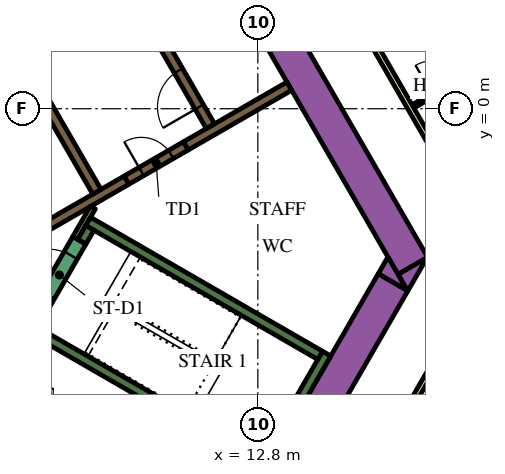
"""IFC4 building model, lengths in metres.
Left out: names, types, materials, properties, quantities, classifications, styles, units other than length and angle.
Written with IfcOpenShell. Run it as: python <this file> out.ifc"""

import sys

from ifc_helpers import new_model, si_unit, direction, frame, frame_2d, origin, place, context, subcontext, project, spatial, polyline, rectangle, outline, extrude, element, fill, save


model = new_model("IFC4")
c1 = context("Model", 3, precision=1e-05, world=origin(), true_north=direction((0.0, 1.0)))
c2 = subcontext(c1, "Body", "Model", "MODEL_VIEW")
j1 = project(units=[si_unit("LENGTHUNIT", "METRE"), si_unit("PLANEANGLEUNIT", "RADIAN")], contexts=[c1])
p1 = place(None, origin())
s1 = spatial("IfcSite", under=j1, at=p1, CompositionType="ELEMENT")
p2 = place(p1, origin())
s2 = spatial("IfcBuilding", under=s1, at=p2, CompositionType="ELEMENT")
p3 = place(p2, frame((0.0, 0.0, 111.0)))
s3 = spatial("IfcBuildingStorey", under=s2, at=p3, CompositionType="ELEMENT", Elevation=111.0)
p4 = place(p3, frame((6.711, 13.476, 0.0), z_axis=(0.0, 0.0, 1.0), x_axis=(0.500002723396, -0.866023831425, 0.0)))
e1 = element("IfcWall", 1, at=p4, inside=s3, PredefinedType="SOLIDWALL", context=c2, shape_type="SweptSolid", body=[
    extrude(rectangle(XDim=20.334, YDim=0.9, at=frame_2d((10.167, 0.0))), origin(), (0.0, 0.0, 1.0), 3.9),
])
p5 = place(p3, origin())
e2 = element("IfcWall", 2, at=p5, inside=s3, PredefinedType="SOLIDWALL", context=c2, shape_type="SweptSolid", body=[
    extrude(outline(polyline([(16.743, -4.8), (16.489, -4.36), (17.251, -3.92), (16.743, -4.8)])), origin(), (0.0, 0.0, 1.0), 3.9),
])
p6 = place(p3, frame((11.695, -12.644, 0.0), z_axis=(0.0, 0.0, 1.0), x_axis=(0.500010229568, 0.86601949766, 0.0)))
e3 = element("IfcWall", 3, at=p6, inside=s3, PredefinedType="SOLIDWALL", context=c2, shape_type="SweptSolid", body=[
    extrude(rectangle(XDim=9.326, YDim=0.9, at=frame_2d((4.663, 0.0))), origin(), (0.0, 0.0, 1.0), 3.9),
])
e4 = element("IfcWall", 4, at=p5, inside=s3, PredefinedType="SOLIDWALL", context=c2, shape_type="SweptSolid", body=[
    extrude(outline(polyline([(16.223, -3.9), (16.732, -4.78), (15.969, -4.34), (16.223, -3.9)])), origin(), (0.0, 0.0, 1.0), 3.9),
])
p7 = place(p3, frame((12.885, -9.431, 0.0), z_axis=(0.0, 0.0, 1.0), x_axis=(0.500020560727, 0.866013532718, 0.0)))
e5 = element("IfcWall", 5, at=p7, inside=s3, PredefinedType="SOLIDWALL", context=c2, shape_type="SweptSolid", body=[
    extrude(rectangle(XDim=3.45, YDim=0.25, at=frame_2d((1.725, 0.0))), origin(), (0.0, 0.0, 1.0), 3.9),
])
p8 = place(p3, frame((12.84, -9.261, 0.0), z_axis=(0.0, 0.0, 1.0), x_axis=(-0.866013990052, 0.500019768644, 0.0)))
e6 = element("IfcWall", 6, at=p8, inside=s3, PredefinedType="SOLIDWALL", context=c2, shape_type="SweptSolid", body=[
    extrude(rectangle(XDim=6.8, YDim=0.25, at=frame_2d((3.4, 0.0))), origin(), (0.0, 0.0, 1.0), 3.9),
])
p9 = place(p3, frame((8.334, -2.964, 0.0), z_axis=(0.0, 0.0, 1.0), x_axis=(0.866016039709, -0.500016218704, 0.0)))
e7 = element("IfcWall", 7, at=p9, inside=s3, PredefinedType="SOLIDWALL", context=c2, shape_type="SweptSolid", body=[
    extrude(rectangle(XDim=7.05, YDim=0.25, at=frame_2d((3.525, 0.0))), origin(), (0.0, 0.0, 1.0), 3.9),
])
p10 = place(p3, frame((8.168, -3.503, 0.0), z_axis=(0.0, 0.0, 1.0), x_axis=(0.49972245349, 0.866185586049, 0.0)))
e8 = element("IfcWall", 8, at=p10, inside=s3, PredefinedType="SOLIDWALL", context=c2, shape_type="SweptSolid", body=[
    extrude(rectangle(XDim=0.425, YDim=0.25, at=frame_2d((0.212, 0.0))), origin(), (0.0, 0.0, 1.0), 3.9),
])
p11 = place(p3, frame((13.629, 0.594, 0.0), z_axis=(0.0, 0.0, 1.0), x_axis=(-0.86602790099, -0.499995674689, 0.0)))
e9 = element("IfcWall", 9, at=p11, inside=s3, PredefinedType="SOLIDWALL", context=c2, shape_type="SweptSolid", body=[
    extrude(rectangle(XDim=3.146, YDim=0.25, at=frame_2d((1.573, 0.0))), origin(), (0.0, 0.0, 1.0), 3.9),
])
p12 = place(p3, frame((6.614, -3.456, 0.0), z_axis=(0.0, 0.0, 1.0), x_axis=(0.86602447079, 0.500001615989, 0.0)))
e10 = element("IfcWall", 10, at=p12, inside=s3, PredefinedType="SOLIDWALL", context=c2, shape_type="SweptSolid", body=[
    extrude(rectangle(XDim=3.154, YDim=0.25, at=frame_2d((1.577, 0.0))), origin(), (0.0, 0.0, 1.0), 3.9),
])
p13 = place(p3, frame((8.459, -2.599, 0.0), z_axis=(0.0, 0.0, 1.0), x_axis=(-0.500041054325, -0.866001699761, 0.0)))
e11 = element("IfcWall", 11, at=p13, inside=s3, PredefinedType="PARTITIONING", context=c2, shape_type="SweptSolid", body=[
    extrude(rectangle(XDim=0.929, YDim=0.15, at=frame_2d((0.464, 0.0))), origin(), (0.0, 0.0, 1.0), 3.9),
])
p14 = place(p3, frame((11.553, -0.46, 0.0), z_axis=(0.0, 0.0, 1.0), x_axis=(-0.500006514828, 0.866021642414, 0.0)))
e12 = element("IfcWall", 12, at=p14, inside=s3, PredefinedType="SOLIDWALL", context=c2, shape_type="SweptSolid", body=[
    extrude(rectangle(XDim=12.35, YDim=0.25, at=frame_2d((6.175, 0.0))), origin(), (0.0, 0.0, 1.0), 3.9),
])
p15 = place(p14, frame((0.585, 0.0, 0.0)))
e13 = element("IfcOpeningElement", 13, at=p15, cuts=e12, PredefinedType="OPENING", context=c2, shape_type="SweptSolid", body=[
    extrude(rectangle(XDim=1.1, YDim=2.1, at=frame_2d((0.55, 1.05))), frame((0.0, 0.135, 0.0), z_axis=(0.0, -1.0, 0.0), x_axis=(1.0, 0.0, 0.0)), (0.0, 0.0, 1.0), 0.27),
])
p16 = place(p14, frame((3.105, 0.0, 0.0)))
e14 = element("IfcOpeningElement", 14, at=p16, cuts=e12, PredefinedType="OPENING", context=c2, shape_type="SweptSolid", body=[
    extrude(rectangle(XDim=1.1, YDim=2.1, at=frame_2d((0.55, 1.05))), frame((0.0, 0.135, 0.0), z_axis=(0.0, -1.0, 0.0), x_axis=(1.0, 0.0, 0.0)), (0.0, 0.0, 1.0), 0.27),
])
p17 = place(p14, frame((5.625, 0.0, 0.0)))
e15 = element("IfcOpeningElement", 15, at=p17, cuts=e12, PredefinedType="OPENING", context=c2, shape_type="SweptSolid", body=[
    extrude(rectangle(XDim=1.1, YDim=2.1, at=frame_2d((0.55, 1.05))), frame((0.0, 0.135, 0.0), z_axis=(0.0, -1.0, 0.0), x_axis=(1.0, 0.0, 0.0)), (0.0, 0.0, 1.0), 0.27),
])
p18 = place(p3, frame((8.565, -2.185, 0.0), z_axis=(0.0, 0.0, 1.0), x_axis=(-0.499997954832, 0.866026584559, 0.0)))
e16 = element("IfcWall", 16, at=p18, inside=s3, PredefinedType="SOLIDWALL", context=c2, shape_type="SweptSolid", body=[
    extrude(rectangle(XDim=12.35, YDim=0.25, at=frame_2d((6.175, 0.0))), origin(), (0.0, 0.0, 1.0), 3.9),
])
p19 = place(p18, frame((5.725, 0.0, 0.0)))
e17 = element("IfcOpeningElement", 17, at=p19, cuts=e16, PredefinedType="OPENING", context=c2, shape_type="SweptSolid", body=[
    extrude(rectangle(XDim=0.9, YDim=2.1, at=frame_2d((0.45, 1.05))), frame((0.0, 0.135, 0.0), z_axis=(0.0, -1.0, 0.0), x_axis=(1.0, 0.0, 0.0)), (0.0, 0.0, 1.0), 0.27),
])
p20 = place(p3, frame((7.053, -5.284, 0.0), z_axis=(0.0, 0.0, 1.0), x_axis=(0.500078061341, 0.865980330357, 0.0)))
e18 = element("IfcWall", 18, at=p20, inside=s3, PredefinedType="SOLIDWALL", context=c2, shape_type="SweptSolid", body=[
    extrude(rectangle(XDim=2.1, YDim=0.4, at=frame_2d((1.05, 0.0))), origin(), (0.0, 0.0, 1.0), 3.9),
])
p21 = place(p20, frame((0.45, 0.0, 0.0)))
e19 = element("IfcOpeningElement", 19, at=p21, cuts=e18, PredefinedType="OPENING", context=c2, shape_type="SweptSolid", body=[
    extrude(rectangle(XDim=1.2, YDim=2.1, at=frame_2d((0.6, 1.05))), frame((0.0, 0.21, 0.0), z_axis=(0.0, -1.0, 0.0), x_axis=(1.0, 0.0, 0.0)), (0.0, 0.0, 1.0), 0.42),
])
p22 = place(p3, frame((9.346, -1.879, 0.0), z_axis=(0.0, 0.0, 1.0), x_axis=(0.866047807691, 0.499961193289, 0.0)))
e20 = element("IfcWall", 20, at=p22, inside=s3, PredefinedType="SOLIDWALL", context=c2, shape_type="SweptSolid", body=[
    extrude(rectangle(XDim=1.8, YDim=0.25, at=frame_2d((0.9, 0.0))), origin(), (0.0, 0.0, 1.0), 3.9),
])
p23 = place(p22, frame((0.45, 0.0, 0.0)))
e21 = element("IfcOpeningElement", 21, at=p23, cuts=e20, PredefinedType="OPENING", context=c2, shape_type="SweptSolid", body=[
    extrude(rectangle(XDim=0.9, YDim=2.1, at=frame_2d((0.45, 1.05))), frame((0.0, 0.135, 0.0), z_axis=(0.0, -1.0, 0.0), x_axis=(1.0, 0.0, 0.0)), (0.0, 0.0, 1.0), 0.27),
])
p24 = place(p3, frame((19.081, -3.9, 0.0), z_axis=(0.0, 0.0, 1.0), x_axis=(-0.499974327079, -0.866040225545, 0.0)))
e22 = element("IfcWall", 22, at=p24, inside=s3, PredefinedType="PARTITIONING", context=c2, shape_type="SweptSolid", body=[
    extrude(rectangle(XDim=5.258, YDim=0.15, at=frame_2d((2.629, 0.0))), origin(), (0.0, 0.0, 1.0), 2.75),
])
p25 = place(p24, frame((0.18, 0.0, 0.0)))
e23 = element("IfcOpeningElement", 23, at=p25, cuts=e22, PredefinedType="OPENING", context=c2, shape_type="SweptSolid", body=[
    extrude(rectangle(XDim=1.0, YDim=2.1, at=frame_2d((0.5, 1.05))), frame((0.0, 0.085, 0.0), z_axis=(0.0, -1.0, 0.0), x_axis=(1.0, 0.0, 0.0)), (0.0, 0.0, 1.0), 0.17),
])
p26 = place(p3, frame((6.163, 18.475, 0.0), z_axis=(0.0, 0.0, 1.0), x_axis=(0.500001317485, -0.866024643133, 0.0)))
e24 = element("IfcWall", 24, at=p26, inside=s3, PredefinedType="PARTITIONING", context=c2, shape_type="SweptSolid", body=[
    extrude(rectangle(XDim=25.767, YDim=0.15, at=frame_2d((12.883, 0.0))), origin(), (0.0, 0.0, 1.0), 2.75),
])
p27 = place(p26, frame((24.241, 0.0, 0.0)))
e25 = element("IfcOpeningElement", 25, at=p27, cuts=e24, PredefinedType="OPENING", context=c2, shape_type="SweptSolid", body=[
    extrude(rectangle(XDim=1.0, YDim=2.1, at=frame_2d((0.5, 1.05))), frame((0.0, 0.085, 0.0), z_axis=(0.0, -1.0, 0.0), x_axis=(1.0, 0.0, 0.0)), (0.0, 0.0, 1.0), 0.17),
])
p28 = place(p26, frame((13.144, 0.0, 0.0)))
e26 = element("IfcOpeningElement", 26, at=p28, cuts=e24, PredefinedType="OPENING", context=c2, shape_type="SweptSolid", body=[
    extrude(rectangle(XDim=1.0, YDim=2.1, at=frame_2d((0.5, 1.05))), frame((0.0, 0.085, 0.0), z_axis=(0.0, -1.0, 0.0), x_axis=(1.0, 0.0, 0.0)), (0.0, 0.0, 1.0), 0.17),
])
p29 = place(p26, frame((10.874, 0.0, 0.0)))
e27 = element("IfcOpeningElement", 27, at=p29, cuts=e24, PredefinedType="OPENING", context=c2, shape_type="SweptSolid", body=[
    extrude(rectangle(XDim=0.9, YDim=2.1, at=frame_2d((0.45, 1.05))), frame((0.0, 0.085, 0.0), z_axis=(0.0, -1.0, 0.0), x_axis=(1.0, 0.0, 0.0)), (0.0, 0.0, 1.0), 0.17),
])
p30 = place(p26, frame((3.718, 0.0, 0.0)))
e28 = element("IfcOpeningElement", 28, at=p30, cuts=e24, PredefinedType="OPENING", context=c2, shape_type="SweptSolid", body=[
    extrude(rectangle(XDim=1.0, YDim=2.1, at=frame_2d((0.5, 1.05))), frame((0.0, 0.085, 0.0), z_axis=(0.0, -1.0, 0.0), x_axis=(1.0, 0.0, 0.0)), (0.0, 0.0, 1.0), 0.17),
])
p31 = place(p26, frame((2.411, 0.0, 0.0)))
e29 = element("IfcOpeningElement", 29, at=p31, cuts=e24, PredefinedType="OPENING", context=c2, shape_type="SweptSolid", body=[
    extrude(rectangle(XDim=1.0, YDim=2.1, at=frame_2d((0.5, 1.05))), frame((0.0, 0.085, 0.0), z_axis=(0.0, -1.0, 0.0), x_axis=(1.0, 0.0, 0.0)), (0.0, 0.0, 1.0), 0.17),
])
p32 = place(p3, frame((16.881, 0.061, 0.0), z_axis=(0.0, 0.0, 1.0), x_axis=(0.866019956843, 0.50000943426, 0.0)))
e30 = element("IfcWall", 30, at=p32, inside=s3, PredefinedType="PARTITIONING", context=c2, shape_type="SweptSolid", body=[
    extrude(rectangle(XDim=2.7, YDim=0.1, at=frame_2d((1.35, 0.0))), origin(), (0.0, 0.0, 1.0), 2.75),
])
p33 = place(p32, frame((0.6, 0.0, 0.0)))
e31 = element("IfcOpeningElement", 31, at=p33, cuts=e30, PredefinedType="OPENING", context=c2, shape_type="SweptSolid", body=[
    extrude(rectangle(XDim=0.9, YDim=2.1, at=frame_2d((0.45, 1.05))), frame((0.0, 0.06, 0.0), z_axis=(0.0, -1.0, 0.0), x_axis=(1.0, 0.0, 0.0)), (0.0, 0.0, 1.0), 0.12),
])
p34 = place(p15, origin())
e32 = element("IfcDoor", 32, at=p34, inside=s3, OperationType="DOUBLE_DOOR_SLIDING", PredefinedType="DOOR", context=c2, shape_type="SweptSolid", body=[
    extrude(rectangle(XDim=1.1, YDim=2.1, at=frame_2d((0.55, 1.05))), frame((0.0, 0.025, 0.0), z_axis=(0.0, -1.0, 0.0), x_axis=(1.0, 0.0, 0.0)), (0.0, 0.0, 1.0), 0.05),
])
fill(e13, e32)
p35 = place(p21, origin())
e33 = element("IfcDoor", 33, at=p35, inside=s3, OperationType="SINGLE_SWING_LEFT", PredefinedType="DOOR", context=c2, shape_type="SweptSolid", body=[
    extrude(rectangle(XDim=1.2, YDim=2.1, at=frame_2d((0.6, 1.05))), frame((0.0, 0.025, 0.0), z_axis=(0.0, -1.0, 0.0), x_axis=(1.0, 0.0, 0.0)), (0.0, 0.0, 1.0), 0.05),
])
fill(e19, e33)
p36 = place(p23, origin())
e34 = element("IfcDoor", 34, at=p36, inside=s3, OperationType="SINGLE_SWING_LEFT", PredefinedType="DOOR", context=c2, shape_type="SweptSolid", body=[
    extrude(rectangle(XDim=0.9, YDim=2.1, at=frame_2d((0.45, 1.05))), frame((0.0, 0.025, 0.0), z_axis=(0.0, -1.0, 0.0), x_axis=(1.0, 0.0, 0.0)), (0.0, 0.0, 1.0), 0.05),
])
fill(e21, e34)
save(model, sys.argv[1])
